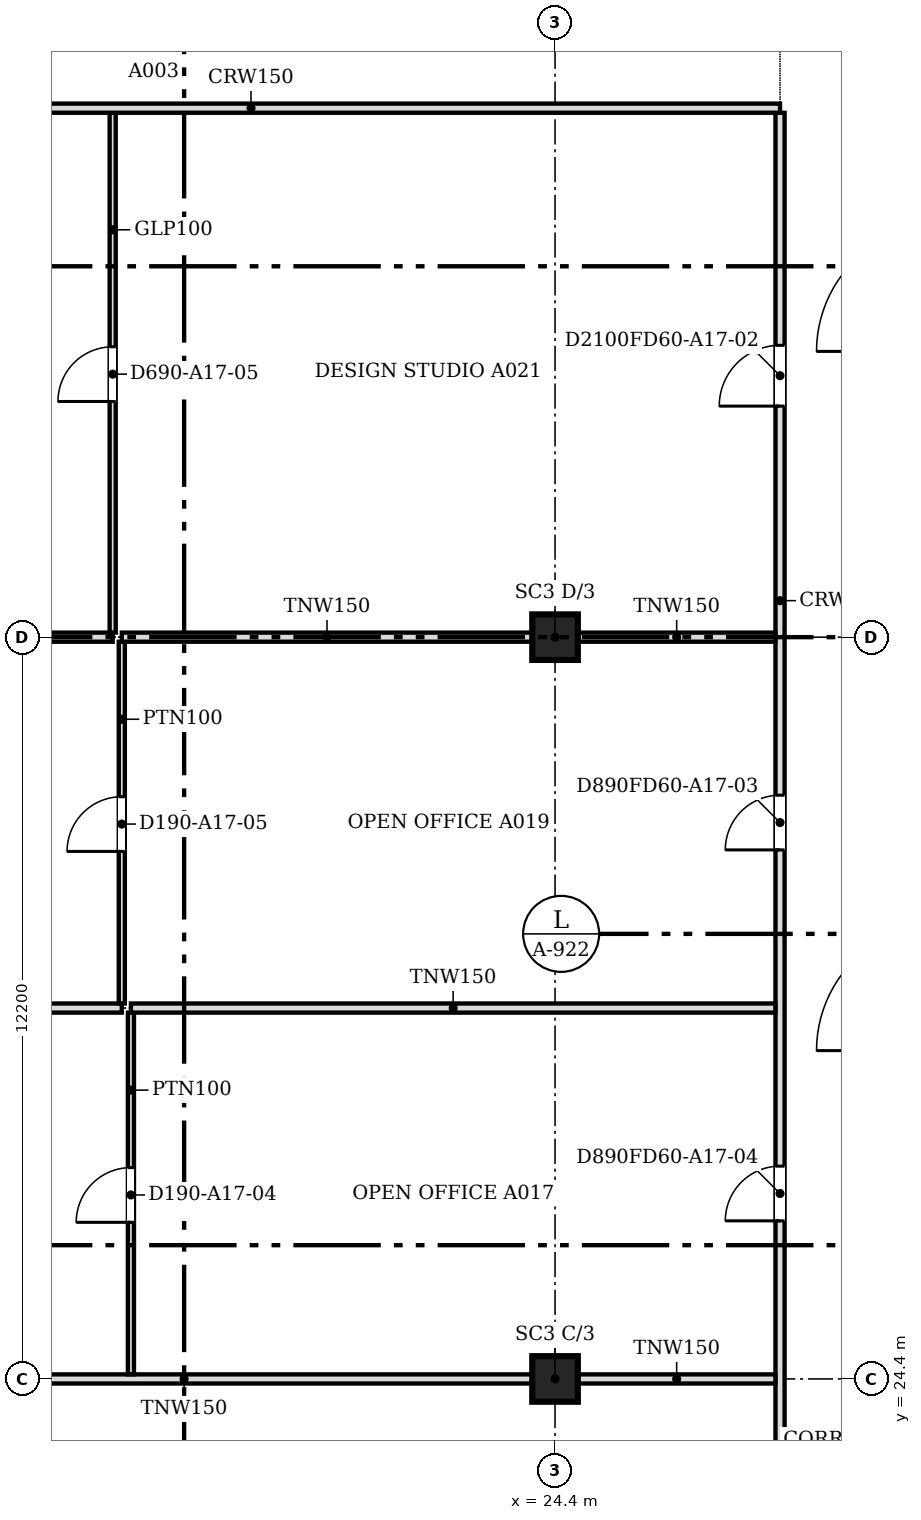
"""IFC4 building model, lengths in metres.
Left out: names, types, materials, properties, quantities, classifications, styles, units other than length and angle.
Written with IfcOpenShell. Run it as: python <this file> out.ifc"""

import sys

from ifc_helpers import new_model, si_unit, direction, frame, frame_2d, origin, origin_2d, place, context, subcontext, project, spatial, rectangle, extrude, source, transform, mapped, element, fill, save


model = new_model("IFC4")
c1 = context("Model", 3, precision=1e-05, world=origin(), true_north=direction((0.0, 1.0)))
c2 = subcontext(c1, "Body", "Model", "MODEL_VIEW")
j1 = project(units=[si_unit("LENGTHUNIT", "METRE"), si_unit("PLANEANGLEUNIT", "RADIAN")], contexts=[c1])
p1 = place(None, origin())
s1 = spatial("IfcSite", under=j1, at=p1, CompositionType="ELEMENT")
p2 = place(p1, origin())
s2 = spatial("IfcBuilding", under=s1, at=p2, CompositionType="ELEMENT")
p3 = place(p2, frame((0.0, 0.0, 189.6)))
s3 = spatial("IfcBuildingStorey", under=s2, at=p3, CompositionType="ELEMENT", Elevation=189.6)
for number, where, z_axis, x_axis in (
    (1, (24.4, 24.4, 0.0), (0.0, 0.0, 1.0), (1.0, 0.0, 0.0)),
    (2, (24.4, 36.6, 0.0), (0.0, 0.0, 1.0), (1.0, 0.0, 0.0)),
):
    element("IfcColumn", number, at=place(p3, frame(where, z_axis=z_axis, x_axis=x_axis)), inside=s3, PredefinedType="COLUMN", context=c2, shape_type="SweptSolid", body=[
        extrude(rectangle(XDim=0.75, YDim=0.75, at=origin_2d()), origin(), (0.0, 0.0, 1.0), 3.55),
    ])
p4 = place(p3, frame((28.1, 18.8, 0.0), z_axis=(0.0, 0.0, 1.0), x_axis=(0.0, 1.0, 0.0)))
e3 = element("IfcWall", 3, at=p4, inside=s3, PredefinedType="PARTITIONING", context=c2, shape_type="SweptSolid", body=[
    extrude(rectangle(XDim=26.424, YDim=0.15, at=frame_2d((13.212, 0.0))), origin(), (0.0, 0.0, 1.0), 2.947),
])
m1 = source(origin(), c2, "Body", "SweptSolid", [
    extrude(rectangle(XDim=0.9, YDim=2.1, at=frame_2d((0.45, 1.05))), frame((0.0, 0.085, 0.0), z_axis=(0.0, -1.0, 0.0), x_axis=(1.0, 0.0, 0.0)), (0.0, 0.0, 1.0), 0.17),
])
p5 = place(p4, frame((1.1, 0.0, 0.0)))
e4 = element("IfcOpeningElement", 4, at=p5, cuts=e3, PredefinedType="OPENING", context=c2, shape_type="MappedRepresentation", body=[
    mapped(m1, transform((0.0, 0.0, 0.0), scale=1.0)),
])
p6 = place(p4, frame((14.301, 0.0, 0.0)))
e5 = element("IfcOpeningElement", 5, at=p6, cuts=e3, PredefinedType="OPENING", context=c2, shape_type="MappedRepresentation", body=[
    mapped(m1, transform((0.0, 0.0, 0.0), scale=1.0)),
])
p7 = place(p4, frame((8.2, 0.0, 0.0)))
e6 = element("IfcOpeningElement", 6, at=p7, cuts=e3, PredefinedType="OPENING", context=c2, shape_type="MappedRepresentation", body=[
    mapped(m1, transform((0.0, 0.0, 0.0), scale=1.0)),
])
m2 = source(origin(), c2, "Body", "SweptSolid", [
    extrude(rectangle(XDim=1.0, YDim=2.1, at=frame_2d((0.5, 1.05))), frame((0.0, 0.085, 0.0), z_axis=(0.0, -1.0, 0.0), x_axis=(1.0, 0.0, 0.0)), (0.0, 0.0, 1.0), 0.17),
])
p8 = place(p4, frame((21.6, 0.0, 0.0)))
e7 = element("IfcOpeningElement", 7, at=p8, cuts=e3, PredefinedType="OPENING", context=c2, shape_type="MappedRepresentation", body=[
    mapped(m2, transform((0.0, 0.0, 0.0), scale=1.0)),
])
p9 = place(p3, frame((12.576, 24.4, 0.0), z_axis=(0.0, 0.0, 1.0), x_axis=(1.0, 0.0, 0.0)))
e8 = element("IfcWall", 8, at=p9, inside=s3, PredefinedType="PARTITIONING", context=c2, shape_type="SweptSolid", body=[
    extrude(rectangle(XDim=11.448, YDim=0.15, at=frame_2d((5.724, 0.0))), origin(), (0.0, 0.0, 1.0), 2.947),
])
p10 = place(p3, frame((24.776, 24.4, 0.0), z_axis=(0.0, 0.0, 1.0), x_axis=(1.0, 0.0, 0.0)))
e9 = element("IfcWall", 9, at=p10, inside=s3, PredefinedType="PARTITIONING", context=c2, shape_type="SweptSolid", body=[
    extrude(rectangle(XDim=3.248, YDim=0.15, at=frame_2d((1.624, 0.0))), origin(), (0.0, 0.0, 1.0), 2.947),
])
p11 = place(p3, frame((17.425, 24.476, 0.0), z_axis=(0.0, 0.0, 1.0), x_axis=(0.0, 1.0, 0.0)))
e10 = element("IfcWall", 10, at=p11, inside=s3, PredefinedType="PARTITIONING", context=c2, shape_type="SweptSolid", body=[
    extrude(rectangle(XDim=5.948, YDim=0.1, at=frame_2d((2.974, 0.0))), origin(), (0.0, 0.0, 1.0), 2.947),
])
m3 = source(origin(), c2, "Body", "SweptSolid", [
    extrude(rectangle(XDim=0.9, YDim=2.1, at=frame_2d((0.45, 1.05))), frame((0.0, 0.06, 0.0), z_axis=(0.0, -1.0, 0.0), x_axis=(1.0, 0.0, 0.0)), (0.0, 0.0, 1.0), 0.12),
])
p12 = place(p11, frame((2.5, 0.0, 0.0)))
e11 = element("IfcOpeningElement", 11, at=p12, cuts=e10, PredefinedType="OPENING", context=c2, shape_type="MappedRepresentation", body=[
    mapped(m3, transform((0.0, 0.0, 0.0), scale=1.0)),
])
p13 = place(p3, frame((12.2, 30.5, 0.0), z_axis=(0.0, 0.0, 1.0), x_axis=(1.0, 0.0, 0.0)))
e12 = element("IfcWall", 12, at=p13, inside=s3, PredefinedType="PARTITIONING", context=c2, shape_type="SweptSolid", body=[
    extrude(rectangle(XDim=5.075, YDim=0.15, at=frame_2d((2.538, 0.0))), origin(), (0.0, 0.0, 1.0), 2.947),
])
p14 = place(p3, frame((17.425, 30.5, 0.0), z_axis=(0.0, 0.0, 1.0), x_axis=(1.0, 0.0, 0.0)))
e13 = element("IfcWall", 13, at=p14, inside=s3, PredefinedType="PARTITIONING", context=c2, shape_type="SweptSolid", body=[
    extrude(rectangle(XDim=10.599, YDim=0.15, at=frame_2d((5.299, 0.0))), origin(), (0.0, 0.0, 1.0), 2.947),
])
p15 = place(p3, frame((17.275, 30.576, 0.0), z_axis=(0.0, 0.0, 1.0), x_axis=(0.0, 1.0, 0.0)))
e14 = element("IfcWall", 14, at=p15, inside=s3, PredefinedType="PARTITIONING", context=c2, shape_type="SweptSolid", body=[
    extrude(rectangle(XDim=5.948, YDim=0.1, at=frame_2d((2.974, 0.0))), origin(), (0.0, 0.0, 1.0), 2.947),
])
p16 = place(p15, frame((2.5, 0.0, 0.0)))
e15 = element("IfcOpeningElement", 15, at=p16, cuts=e14, PredefinedType="OPENING", context=c2, shape_type="MappedRepresentation", body=[
    mapped(m3, transform((0.0, 0.0, 0.0), scale=1.0)),
])
p17 = place(p3, frame((12.576, 36.6, 0.0), z_axis=(0.0, 0.0, 1.0), x_axis=(1.0, 0.0, 0.0)))
e16 = element("IfcWall", 16, at=p17, inside=s3, PredefinedType="PARTITIONING", context=c2, shape_type="SweptSolid", body=[
    extrude(rectangle(XDim=4.549, YDim=0.15, at=frame_2d((2.274, 0.0))), origin(), (0.0, 0.0, 1.0), 2.947),
])
p18 = place(p3, frame((17.275, 36.6, 0.0), z_axis=(0.0, 0.0, 1.0), x_axis=(1.0, 0.0, 0.0)))
e17 = element("IfcWall", 17, at=p18, inside=s3, PredefinedType="PARTITIONING", context=c2, shape_type="SweptSolid", body=[
    extrude(rectangle(XDim=6.749, YDim=0.15, at=frame_2d((3.375, 0.0))), origin(), (0.0, 0.0, 1.0), 2.947),
])
p19 = place(p3, frame((24.776, 36.6, 0.0), z_axis=(0.0, 0.0, 1.0), x_axis=(1.0, 0.0, 0.0)))
e18 = element("IfcWall", 18, at=p19, inside=s3, PredefinedType="PARTITIONING", context=c2, shape_type="SweptSolid", body=[
    extrude(rectangle(XDim=3.248, YDim=0.15, at=frame_2d((1.624, 0.0))), origin(), (0.0, 0.0, 1.0), 2.947),
])
p20 = place(p3, frame((17.125, 36.676, 0.0), z_axis=(0.0, 0.0, 1.0), x_axis=(0.0, 1.0, 0.0)))
e19 = element("IfcWall", 19, at=p20, inside=s3, PredefinedType="PARTITIONING", context=c2, shape_type="SweptSolid", body=[
    extrude(rectangle(XDim=8.548, YDim=0.1, at=frame_2d((4.274, 0.0))), origin(), (0.0, 0.0, 1.0), 2.947),
])
p21 = place(p20, frame((3.8, 0.0, 0.0)))
e20 = element("IfcOpeningElement", 20, at=p21, cuts=e19, PredefinedType="OPENING", context=c2, shape_type="MappedRepresentation", body=[
    mapped(m3, transform((0.0, 0.0, 0.0), scale=1.0)),
])
p22 = place(p3, frame((28.1, 45.3, 0.0), z_axis=(0.0, 0.0, 1.0), x_axis=(-1.0, 0.0, 0.0)))
e21 = element("IfcWall", 21, at=p22, inside=s3, PredefinedType="PARTITIONING", context=c2, shape_type="SweptSolid", body=[
    extrude(rectangle(XDim=20.6, YDim=0.15, at=frame_2d((10.3, 0.0))), origin(), (0.0, 0.0, 1.0), 2.947),
])
m4 = source(origin(), c2, "Body", "SweptSolid", [
    extrude(rectangle(XDim=1.8, YDim=2.1, at=frame_2d((0.9, 1.05))), frame((0.0, 0.085, 0.0), z_axis=(0.0, -1.0, 0.0), x_axis=(1.0, 0.0, 0.0)), (0.0, 0.0, 1.0), 0.17),
])
p23 = place(p22, frame((17.4, 0.0, 0.0)))
e22 = element("IfcOpeningElement", 22, at=p23, cuts=e21, PredefinedType="OPENING", context=c2, shape_type="MappedRepresentation", body=[
    mapped(m4, transform((0.0, 0.0, 0.0), scale=1.0)),
])
m5 = source(origin(), c2, "Body", "SweptSolid", [
    extrude(rectangle(XDim=0.9, YDim=2.1, at=frame_2d((0.45, 1.05))), frame((0.0, 0.025, 0.0), z_axis=(0.0, -1.0, 0.0), x_axis=(1.0, 0.0, 0.0)), (0.0, 0.0, 1.0), 0.05),
])
p24 = place(p12, origin())
e23 = element("IfcDoor", 23, at=p24, inside=s3, OperationType="SINGLE_SWING_LEFT", PredefinedType="DOOR", context=c2, shape_type="MappedRepresentation", body=[
    mapped(m5, transform((0.0, 0.0, 0.0), scale=1.0)),
])
fill(e11, e23)
p25 = place(p16, origin())
e24 = element("IfcDoor", 24, at=p25, inside=s3, OperationType="SINGLE_SWING_LEFT", PredefinedType="DOOR", context=c2, shape_type="MappedRepresentation", body=[
    mapped(m5, transform((0.0, 0.0, 0.0), scale=1.0)),
])
fill(e15, e24)
p26 = place(p6, origin())
e25 = element("IfcDoor", 25, at=p26, inside=s3, OperationType="SINGLE_SWING_LEFT", PredefinedType="DOOR", context=c2, shape_type="MappedRepresentation", body=[
    mapped(m5, transform((0.0, 0.0, 0.0), scale=1.0)),
])
fill(e5, e25)
p27 = place(p7, origin())
e26 = element("IfcDoor", 26, at=p27, inside=s3, OperationType="SINGLE_SWING_LEFT", PredefinedType="DOOR", context=c2, shape_type="MappedRepresentation", body=[
    mapped(m5, transform((0.0, 0.0, 0.0), scale=1.0)),
])
fill(e6, e26)
p28 = place(p21, origin())
e27 = element("IfcDoor", 27, at=p28, inside=s3, OperationType="SINGLE_SWING_LEFT", PredefinedType="DOOR", context=c2, shape_type="MappedRepresentation", body=[
    mapped(m5, transform((0.0, 0.0, 0.0), scale=1.0)),
])
fill(e20, e27)
m6 = source(origin(), c2, "Body", "SweptSolid", [
    extrude(rectangle(XDim=1.0, YDim=2.1, at=frame_2d((0.5, 1.05))), frame((0.0, 0.025, 0.0), z_axis=(0.0, -1.0, 0.0), x_axis=(1.0, 0.0, 0.0)), (0.0, 0.0, 1.0), 0.05),
])
p29 = place(p8, origin())
e28 = element("IfcDoor", 28, at=p29, inside=s3, OperationType="SINGLE_SWING_LEFT", PredefinedType="DOOR", context=c2, shape_type="MappedRepresentation", body=[
    mapped(m6, transform((0.0, 0.0, 0.0), scale=1.0)),
])
fill(e7, e28)
save(model, sys.argv[1])
